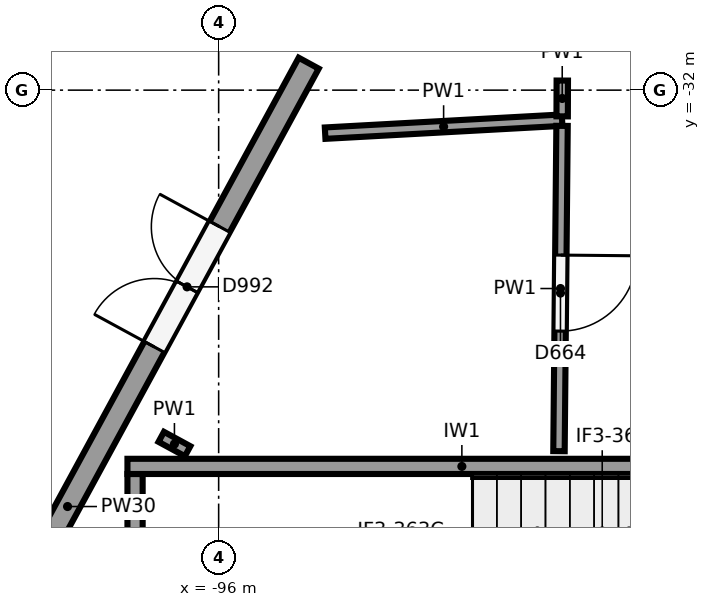
"""IFC4 building model, lengths in metres.
Left out: names, types, materials, properties, quantities, classifications, styles, units other than length and angle.
Written with IfcOpenShell. Run it as: python <this file> out.ifc"""

import sys

from ifc_helpers import new_model, si_unit, direction, frame, frame_2d, origin, origin_2d, place, context, subcontext, project, spatial, rectangle, circle, extrude, element, fill, save


model = new_model("IFC4")
c1 = context("Model", 3, precision=1e-05, world=origin(), true_north=direction((0.0, 1.0)))
c2 = subcontext(c1, "Body", "Model", "MODEL_VIEW")
j1 = project(units=[si_unit("LENGTHUNIT", "METRE"), si_unit("PLANEANGLEUNIT", "RADIAN")], contexts=[c1])
p1 = place(None, origin())
s1 = spatial("IfcSite", under=j1, at=p1, CompositionType="ELEMENT")
p2 = place(p1, origin())
s2 = spatial("IfcBuilding", under=s1, at=p2, CompositionType="ELEMENT")
p3 = place(p2, frame((0.0, 0.0, 6.5)))
s3 = spatial("IfcBuildingStorey", under=s2, at=p3, CompositionType="ELEMENT", Elevation=6.5)
p4 = place(p3, frame((-94.6, -31.25, 0.0), z_axis=(0.0, 0.0, 1.0), x_axis=(1.0, 0.0, 0.0)))
e1 = element("IfcColumn", 1, at=p4, inside=s3, PredefinedType="COLUMN", context=c2, shape_type="SweptSolid", body=[
    extrude(circle(Radius=0.45, at=origin_2d()), origin(), (0.0, 0.0, 1.0), 5.5),
])
p5 = place(p3, frame((-101.161, -43.311, 0.0), z_axis=(0.0, 0.0, 1.0), x_axis=(0.477867771117, 0.878431780691, 0.0)))
e2 = element("IfcWall", 2, at=p5, inside=s3, PredefinedType="SOLIDWALL", context=c2, shape_type="SweptSolid", body=[
    extrude(rectangle(XDim=13.28, YDim=0.3, at=frame_2d((6.64, 0.0))), origin(), (0.0, 0.0, 1.0), 3.85),
])
p6 = place(p5, frame((9.03, 0.0, 0.0)))
e3 = element("IfcOpeningElement", 3, at=p6, cuts=e2, PredefinedType="OPENING", context=c2, shape_type="SweptSolid", body=[
    extrude(rectangle(XDim=1.8, YDim=2.4, at=frame_2d((0.9, 1.2))), frame((0.0, 0.16, 0.0), z_axis=(0.0, -1.0, 0.0), x_axis=(1.0, 0.0, 0.0)), (0.0, 0.0, 1.0), 0.32),
])
p7 = place(p3, frame((-97.2, -36.95, 0.0), z_axis=(0.0, 0.0, 1.0), x_axis=(1.0, 0.0, 0.0)))
e4 = element("IfcWall", 4, at=p7, inside=s3, PredefinedType="SHEAR", context=c2, shape_type="SweptSolid", body=[
    extrude(rectangle(XDim=8.8, YDim=0.2, at=frame_2d((4.4, 0.0))), origin(), (0.0, 0.0, 1.0), 5.15),
])
p8 = place(p3, frame((-97.1, -37.05, 0.0), z_axis=(0.0, 0.0, 1.0), x_axis=(0.0, -1.0, 0.0)))
e5 = element("IfcWall", 5, at=p8, inside=s3, PredefinedType="SHEAR", context=c2, shape_type="SweptSolid", body=[
    extrude(rectangle(XDim=6.6, YDim=0.2, at=frame_2d((3.3, 0.0))), origin(), (0.0, 0.0, 1.0), 5.15),
])
p9 = place(p3, frame((-96.408, -36.75, 0.0), z_axis=(0.0, 0.0, 1.0), x_axis=(-0.878438378965, 0.477855641759, 0.0)))
e6 = element("IfcWall", 6, at=p9, inside=s3, PredefinedType="PARTITIONING", context=c2, shape_type="SweptSolid", body=[
    extrude(rectangle(XDim=0.395, YDim=0.15, at=frame_2d((0.198, 0.0))), origin(), (0.0, 0.0, 1.0), 5.15),
])
p10 = place(p3, frame((-94.599, -32.566, 0.0), z_axis=(0.0, 0.0, 1.0), x_axis=(0.998501215995, 0.054729531845, 0.0)))
e7 = element("IfcWall", 7, at=p10, inside=s3, PredefinedType="PARTITIONING", context=c2, shape_type="SweptSolid", body=[
    extrude(rectangle(XDim=3.123, YDim=0.15, at=frame_2d((1.561, 0.0))), origin(), (0.0, 0.0, 1.0), 5.15),
])
p11 = place(p3, frame((-91.482, -32.47, 0.0), z_axis=(0.0, 0.0, 1.0), x_axis=(-0.009411482079, -0.999955711022, 0.0)))
e8 = element("IfcWall", 8, at=p11, inside=s3, PredefinedType="PARTITIONING", context=c2, shape_type="SweptSolid", body=[
    extrude(rectangle(XDim=4.28, YDim=0.15, at=frame_2d((2.14, 0.0))), origin(), (0.0, 0.0, 1.0), 5.15),
])
p12 = place(p11, frame((1.7, 0.0, 0.0)))
e9 = element("IfcOpeningElement", 9, at=p12, cuts=e8, PredefinedType="OPENING", context=c2, shape_type="SweptSolid", body=[
    extrude(rectangle(XDim=1.0, YDim=2.1, at=frame_2d((0.5, 1.05))), frame((0.0, 0.085, 0.0), z_axis=(0.0, -1.0, 0.0), x_axis=(1.0, 0.0, 0.0)), (0.0, 0.0, 1.0), 0.17),
])
p13 = place(p3, frame((-91.479, -31.874, 0.0), z_axis=(0.0, 0.0, 1.0), x_axis=(-0.00362691915, -0.999993422707, 0.0)))
e10 = element("IfcWall", 10, at=p13, inside=s3, PredefinedType="PARTITIONING", context=c2, shape_type="SweptSolid", body=[
    extrude(rectangle(XDim=0.471, YDim=0.15, at=frame_2d((0.236, 0.0))), origin(), (0.0, 0.0, 1.0), 5.15),
])
p14 = place(p6, origin())
e11 = element("IfcDoor", 11, at=p14, inside=s3, OperationType="DOUBLE_DOOR_SINGLE_SWING", PredefinedType="DOOR", context=c2, shape_type="SweptSolid", body=[
    extrude(rectangle(XDim=1.8, YDim=2.4, at=frame_2d((0.9, 1.2))), frame((0.0, 0.025, 0.0), z_axis=(0.0, -1.0, 0.0), x_axis=(1.0, 0.0, 0.0)), (0.0, 0.0, 1.0), 0.05),
])
fill(e3, e11)
p15 = place(p12, origin())
e12 = element("IfcDoor", 12, at=p15, inside=s3, OperationType="SINGLE_SWING_LEFT", PredefinedType="DOOR", context=c2, shape_type="SweptSolid", body=[
    extrude(rectangle(XDim=1.0, YDim=2.1, at=frame_2d((0.5, 1.05))), frame((0.0, 0.025, 0.0), z_axis=(0.0, -1.0, 0.0), x_axis=(1.0, 0.0, 0.0)), (0.0, 0.0, 1.0), 0.05),
])
fill(e9, e12)
save(model, sys.argv[1])
